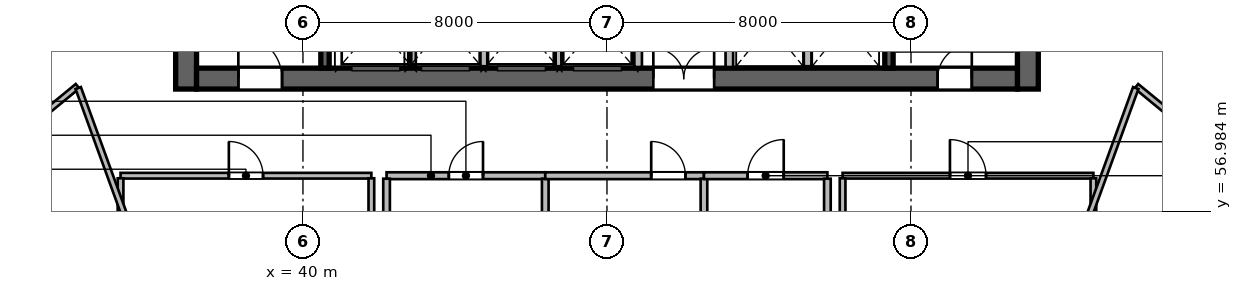
"""IFC4 building model, lengths in metres.
Left out: names, types, materials, properties, quantities, classifications, styles, units other than length and angle.
Written with IfcOpenShell. Run it as: python <this file> out.ifc"""

import sys

from ifc_helpers import new_model, si_unit, direction, frame, frame_2d, origin, place, context, subcontext, project, spatial, rectangle, extrude, source, transform, mapped, element, fill, save


model = new_model("IFC4")
c1 = context("Model", 3, precision=1e-05, world=origin(), true_north=direction((0.0, 1.0)))
c2 = subcontext(c1, "Body", "Model", "MODEL_VIEW")
j1 = project(units=[si_unit("LENGTHUNIT", "METRE"), si_unit("PLANEANGLEUNIT", "RADIAN")], contexts=[c1])
p1 = place(None, origin())
s1 = spatial("IfcSite", under=j1, at=p1, CompositionType="ELEMENT")
p2 = place(p1, origin())
s2 = spatial("IfcBuilding", under=s1, at=p2, CompositionType="ELEMENT")
p3 = place(p2, frame((0.0, 0.0, 46.2)))
s3 = spatial("IfcBuildingStorey", under=s2, at=p3, CompositionType="ELEMENT", Elevation=46.2)
m1 = source(origin(), c2, "Body", "SweptSolid", [
    extrude(rectangle(XDim=12.0, YDim=0.55, at=frame_2d((6.0, 0.0))), origin(), (0.0, 0.0, 1.0), 3.6),
])
for number, where, z_axis, x_axis in (
    (1, (36.925, 60.2, 0.0), (0.0, 0.0, 1.0), (0.0, 1.0, 0.0)),
    (2, (59.075, 60.2, 0.0), (0.0, 0.0, 1.0), (0.0, 1.0, 0.0)),
):
    element("IfcWall", number, at=place(p3, frame(where, z_axis=z_axis, x_axis=x_axis)), inside=s3, PredefinedType="SHEAR", context=c2, shape_type="MappedRepresentation", body=[
        mapped(m1, transform((0.0, 0.0, 0.0), scale=1.0)),
    ])
m2 = source(origin(), c2, "Body", "SweptSolid", [
    extrude(rectangle(XDim=21.6, YDim=0.55, at=frame_2d((10.8, 0.0))), origin(), (0.0, 0.0, 1.0), 3.6),
])
p4 = place(p3, frame((37.2, 60.475, 0.0), z_axis=(0.0, 0.0, 1.0), x_axis=(1.0, 0.0, 0.0)))
e3 = element("IfcWall", 3, at=p4, inside=s3, PredefinedType="SHEAR", context=c2, shape_type="MappedRepresentation", body=[
    mapped(m2, transform((0.0, 0.0, 0.0), scale=1.0)),
])
p5 = place(p4, frame((1.1, 0.0, 0.0)))
e4 = element("IfcOpeningElement", 4, at=p5, cuts=e3, PredefinedType="OPENING", context=c2, shape_type="SweptSolid", body=[
    extrude(rectangle(XDim=1.15, YDim=2.15, at=frame_2d((0.575, 1.075))), frame((0.0, 0.285, 0.0), z_axis=(0.0, -1.0, 0.0), x_axis=(1.0, 0.0, 0.0)), (0.0, 0.0, 1.0), 0.57),
])
p6 = place(p4, frame((19.5, 0.0, 0.0)))
e5 = element("IfcOpeningElement", 5, at=p6, cuts=e3, PredefinedType="OPENING", context=c2, shape_type="SweptSolid", body=[
    extrude(rectangle(XDim=0.9, YDim=2.1, at=frame_2d((0.45, 1.05))), frame((0.0, 0.285, 0.0), z_axis=(0.0, -1.0, 0.0), x_axis=(1.0, 0.0, 0.0)), (0.0, 0.0, 1.0), 0.57),
])
p7 = place(p4, frame((12.02, 0.0, 0.0)))
e6 = element("IfcOpeningElement", 6, at=p7, cuts=e3, PredefinedType="OPENING", context=c2, shape_type="SweptSolid", body=[
    extrude(rectangle(XDim=1.6, YDim=2.15, at=frame_2d((0.8, 1.075))), frame((0.0, 0.285, 0.0), z_axis=(0.0, -1.0, 0.0), x_axis=(1.0, 0.0, 0.0)), (0.0, 0.0, 1.0), 0.57),
])
m3 = source(origin(), c2, "Body", "SweptSolid", [
    extrude(rectangle(XDim=10.9, YDim=0.22, at=frame_2d((5.45, 0.0))), origin(), (0.0, 0.0, 1.0), 3.6),
])
p8 = place(p3, frame((40.58, 60.75, 0.0), z_axis=(0.0, 0.0, 1.0), x_axis=(0.0, 1.0, 0.0)))
e7 = element("IfcWall", 7, at=p8, inside=s3, PredefinedType="SHEAR", context=c2, shape_type="MappedRepresentation", body=[
    mapped(m3, transform((0.0, 0.0, 0.0), scale=1.0)),
])
p9 = place(p3, frame((55.42, 60.75, 0.0), z_axis=(0.0, 0.0, 1.0), x_axis=(0.0, 1.0, 0.0)))
e8 = element("IfcWall", 8, at=p9, inside=s3, PredefinedType="SHEAR", context=c2, shape_type="MappedRepresentation", body=[
    mapped(m3, transform((0.0, 0.0, 0.0), scale=1.0)),
])
p10 = place(p9, frame((9.495, 0.0, 0.0)))
e9 = element("IfcOpeningElement", 9, at=p10, cuts=e8, PredefinedType="OPENING", context=c2, shape_type="SweptSolid", body=[
    extrude(rectangle(XDim=1.15, YDim=2.15, at=frame_2d((0.575, 1.075))), frame((0.0, 0.12, 0.0), z_axis=(0.0, -1.0, 0.0), x_axis=(1.0, 0.0, 0.0)), (0.0, 0.0, 1.0), 0.24),
])
m4 = source(origin(), c2, "Body", "SweptSolid", [
    extrude(rectangle(XDim=2.24, YDim=0.2, at=frame_2d((1.12, 0.0))), origin(), (0.0, 0.0, 1.0), 3.36),
])
for number, where, z_axis, x_axis in (
    (10, (48.82, 60.78, 0.0), (0.0, 0.0, 1.0), (0.0, 1.0, 0.0)),
    (11, (51.22, 60.78, 0.0), (0.0, 0.0, 1.0), (0.0, 1.0, 0.0)),
):
    element("IfcWall", number, at=place(p3, frame(where, z_axis=z_axis, x_axis=x_axis)), inside=s3, PredefinedType="SOLIDWALL", context=c2, shape_type="MappedRepresentation", body=[
        mapped(m4, transform((0.0, 0.0, 0.0), scale=1.0)),
    ])
m5 = source(origin(), c2, "Body", "SweptSolid", [
    extrude(rectangle(XDim=2.2, YDim=0.2, at=frame_2d((1.1, 0.0))), origin(), (0.0, 0.0, 1.0), 3.36),
])
for number, where, z_axis, x_axis in (
    (12, (42.87, 60.8, 0.0), (0.0, 0.0, 1.0), (0.0, 1.0, 0.0)),
    (13, (44.77, 60.8, 0.0), (0.0, 0.0, 1.0), (0.0, 1.0, 0.0)),
    (14, (46.7, 60.8, 0.0), (0.0, 0.0, 1.0), (0.0, 1.0, 0.0)),
    (15, (53.28, 60.8, 0.0), (0.0, 0.0, 1.0), (0.0, 1.0, 0.0)),
):
    element("IfcWall", number, at=place(p3, frame(where, z_axis=z_axis, x_axis=x_axis)), inside=s3, PredefinedType="SOLIDWALL", context=c2, shape_type="MappedRepresentation", body=[
        mapped(m5, transform((0.0, 0.0, 0.0), scale=1.0)),
    ])
m6 = source(origin(), c2, "Body", "SweptSolid", [
    extrude(rectangle(XDim=6.6, YDim=0.15, at=frame_2d((3.3, 0.0))), origin(), (0.0, 0.0, 1.0), 3.36),
])
p11 = place(p3, frame((35.2, 57.92, 0.0), z_axis=(0.0, 0.0, 1.0), x_axis=(1.0, 0.0, 0.0)))
e16 = element("IfcWall", 16, at=p11, inside=s3, PredefinedType="PARTITIONING", context=c2, shape_type="MappedRepresentation", body=[
    mapped(m6, transform((0.0, 0.0, 0.0), scale=1.0)),
])
p12 = place(p11, frame((2.85, 0.0, 0.0)))
e17 = element("IfcOpeningElement", 17, at=p12, cuts=e16, PredefinedType="OPENING", context=c2, shape_type="SweptSolid", body=[
    extrude(rectangle(XDim=0.9, YDim=2.1, at=frame_2d((0.45, 1.05))), frame((0.0, 0.085, 0.0), z_axis=(0.0, -1.0, 0.0), x_axis=(1.0, 0.0, 0.0)), (0.0, 0.0, 1.0), 0.17),
])
m7 = source(origin(), c2, "Body", "SweptSolid", [
    extrude(rectangle(XDim=3.785, YDim=0.15, at=frame_2d((1.893, 0.0))), origin(), (0.0, 0.0, 1.0), 3.36),
])
for number, where, z_axis, x_axis in (
    (18, (35.2, 54.067, 0.0), (0.0, 0.0, 1.0), (0.0, 1.0, 0.0)),
    (19, (41.8, 54.067, 0.0), (0.0, 0.0, 1.0), (0.0, 1.0, 0.0)),
):
    element("IfcWall", number, at=place(p3, frame(where, z_axis=z_axis, x_axis=x_axis)), inside=s3, PredefinedType="PARTITIONING", context=c2, shape_type="MappedRepresentation", body=[
        mapped(m7, transform((0.0, 0.0, 0.0), scale=1.0)),
    ])
m8 = source(origin(), c2, "Body", "SweptSolid", [
    extrude(rectangle(XDim=4.176, YDim=0.18, at=frame_2d((2.088, 0.0))), origin(), (0.0, 0.0, 1.0), 3.36),
])
p13 = place(p3, frame((42.2, 57.92, 0.0), z_axis=(0.0, 0.0, 1.0), x_axis=(1.0, 0.0, 0.0)))
e20 = element("IfcWall", 20, at=p13, inside=s3, PredefinedType="PLUMBINGWALL", context=c2, shape_type="MappedRepresentation", body=[
    mapped(m8, transform((0.0, 0.0, 0.0), scale=1.0)),
])
p14 = place(p13, frame((1.638, 0.0, 0.0)))
e21 = element("IfcOpeningElement", 21, at=p14, cuts=e20, PredefinedType="OPENING", context=c2, shape_type="SweptSolid", body=[
    extrude(rectangle(XDim=0.9, YDim=2.08, at=frame_2d((0.45, 1.04))), frame((0.0, 0.1, 0.0), z_axis=(0.0, -1.0, 0.0), x_axis=(1.0, 0.0, 0.0)), (0.0, 0.0, 1.0), 0.2),
])
m9 = source(origin(), c2, "Body", "SweptSolid", [
    extrude(rectangle(XDim=3.763, YDim=0.175, at=frame_2d((1.881, 0.0))), origin(), (0.0, 0.0, 1.0), 3.36),
])
for number, where, z_axis, x_axis in (
    (22, (42.2, 54.079, 0.0), (0.0, 0.0, 1.0), (0.0, 1.0, 0.0)),
    (23, (46.376, 54.079, 0.0), (0.0, 0.0, 1.0), (0.0, 1.0, 0.0)),
):
    element("IfcWall", number, at=place(p3, frame(where, z_axis=z_axis, x_axis=x_axis)), inside=s3, PredefinedType="PARTITIONING", context=c2, shape_type="MappedRepresentation", body=[
        mapped(m9, transform((0.0, 0.0, 0.0), scale=1.0)),
    ])
p15 = place(p3, frame((46.376, 57.92, 0.0), z_axis=(0.0, 0.0, 1.0), x_axis=(1.0, 0.0, 0.0)))
e24 = element("IfcWall", 24, at=p15, inside=s3, PredefinedType="PLUMBINGWALL", context=c2, shape_type="MappedRepresentation", body=[
    mapped(m8, transform((0.0, 0.0, 0.0), scale=1.0)),
])
p16 = place(p15, frame((2.788, 0.0, 0.0)))
e25 = element("IfcOpeningElement", 25, at=p16, cuts=e24, PredefinedType="OPENING", context=c2, shape_type="SweptSolid", body=[
    extrude(rectangle(XDim=0.9, YDim=2.08, at=frame_2d((0.45, 1.04))), frame((0.0, 0.1, 0.0), z_axis=(0.0, -1.0, 0.0), x_axis=(1.0, 0.0, 0.0)), (0.0, 0.0, 1.0), 0.2),
])
p17 = place(p3, frame((50.552, 54.079, 0.0), z_axis=(0.0, 0.0, 1.0), x_axis=(0.0, 1.0, 0.0)))
e26 = element("IfcWall", 26, at=p17, inside=s3, PredefinedType="PARTITIONING", context=c2, shape_type="MappedRepresentation", body=[
    mapped(m9, transform((0.0, 0.0, 0.0), scale=1.0)),
])
m10 = source(origin(), c2, "Body", "SweptSolid", [
    extrude(rectangle(XDim=3.248, YDim=0.18, at=frame_2d((1.624, 0.0))), origin(), (0.0, 0.0, 1.0), 3.36),
])
p18 = place(p3, frame((50.552, 57.92, 0.0), z_axis=(0.0, 0.0, 1.0), x_axis=(1.0, 0.0, 0.0)))
e27 = element("IfcWall", 27, at=p18, inside=s3, PredefinedType="PLUMBINGWALL", context=c2, shape_type="MappedRepresentation", body=[
    mapped(m10, transform((0.0, 0.0, 0.0), scale=1.0)),
])
p19 = place(p18, frame((1.149, 0.0, 0.0)))
e28 = element("IfcOpeningElement", 28, at=p19, cuts=e27, PredefinedType="OPENING", context=c2, shape_type="SweptSolid", body=[
    extrude(rectangle(XDim=0.95, YDim=2.12, at=frame_2d((0.475, 1.06))), frame((0.0, 0.1, 0.0), z_axis=(0.0, -1.0, 0.0), x_axis=(1.0, 0.0, 0.0)), (0.0, 0.0, 1.0), 0.2),
])
p20 = place(p3, frame((53.8, 54.079, 0.0), z_axis=(0.0, 0.0, 1.0), x_axis=(0.0, 1.0, 0.0)))
e29 = element("IfcWall", 29, at=p20, inside=s3, PredefinedType="PARTITIONING", context=c2, shape_type="MappedRepresentation", body=[
    mapped(m9, transform((0.0, 0.0, 0.0), scale=1.0)),
])
p21 = place(p3, frame((54.2, 57.92, 0.0), z_axis=(0.0, 0.0, 1.0), x_axis=(1.0, 0.0, 0.0)))
e30 = element("IfcWall", 30, at=p21, inside=s3, PredefinedType="PARTITIONING", context=c2, shape_type="MappedRepresentation", body=[
    mapped(m6, transform((0.0, 0.0, 0.0), scale=1.0)),
])
p22 = place(p21, frame((2.825, 0.0, 0.0)))
e31 = element("IfcOpeningElement", 31, at=p22, cuts=e30, PredefinedType="OPENING", context=c2, shape_type="SweptSolid", body=[
    extrude(rectangle(XDim=0.95, YDim=2.1, at=frame_2d((0.475, 1.05))), frame((0.0, 0.085, 0.0), z_axis=(0.0, -1.0, 0.0), x_axis=(1.0, 0.0, 0.0)), (0.0, 0.0, 1.0), 0.17),
])
for number, where, z_axis, x_axis in (
    (32, (54.2, 54.067, 0.0), (0.0, 0.0, 1.0), (0.0, 1.0, 0.0)),
    (33, (60.8, 54.067, 0.0), (0.0, 0.0, 1.0), (0.0, 1.0, 0.0)),
):
    element("IfcWall", number, at=place(p3, frame(where, z_axis=z_axis, x_axis=x_axis)), inside=s3, PredefinedType="PARTITIONING", context=c2, shape_type="MappedRepresentation", body=[
        mapped(m7, transform((0.0, 0.0, 0.0), scale=1.0)),
    ])
m11 = source(origin(), c2, "Body", "SweptSolid", [
    extrude(rectangle(XDim=6.721, YDim=0.15, at=frame_2d((3.361, 0.0))), origin(), (0.0, 0.0, 1.0), 3.36),
])
p23 = place(p3, frame((28.874, 56.01, 0.0), z_axis=(0.0, 0.0, 1.0), x_axis=(0.772828051199, 0.63461547671, 0.0)))
e34 = element("IfcWall", 34, at=p23, inside=s3, PredefinedType="PARTITIONING", context=c2, shape_type="MappedRepresentation", body=[
    mapped(m11, transform((0.0, 0.0, 0.0), scale=1.0)),
])
m12 = source(origin(), c2, "Body", "SweptSolid", [
    extrude(rectangle(XDim=12.196, YDim=0.15, at=frame_2d((6.098, 0.0))), origin(), (0.0, 0.0, 1.0), 3.36),
])
p24 = place(p3, frame((38.258, 48.766, 0.0), z_axis=(0.0, 0.0, 1.0), x_axis=(-0.342022711534, 0.939691686031, 0.0)))
e35 = element("IfcWall", 35, at=p24, inside=s3, PredefinedType="PARTITIONING", context=c2, shape_type="MappedRepresentation", body=[
    mapped(m12, transform((0.0, 0.0, 0.0), scale=1.0)),
])
p25 = place(p3, frame((61.931, 60.275, 0.0), z_axis=(0.0, 0.0, 1.0), x_axis=(0.772828051199, -0.63461547671, 0.0)))
e36 = element("IfcWall", 36, at=p25, inside=s3, PredefinedType="PARTITIONING", context=c2, shape_type="MappedRepresentation", body=[
    mapped(m11, transform((0.0, 0.0, 0.0), scale=1.0)),
])
p26 = place(p25, frame((2.66, 0.0, 0.0)))
e37 = element("IfcOpeningElement", 37, at=p26, cuts=e36, PredefinedType="OPENING", context=c2, shape_type="SweptSolid", body=[
    extrude(rectangle(XDim=1.4, YDim=2.15, at=frame_2d((0.7, 1.075))), frame((0.0, 0.085, 0.0), z_axis=(0.0, -1.0, 0.0), x_axis=(1.0, 0.0, 0.0)), (0.0, 0.0, 1.0), 0.17),
])
p27 = place(p3, frame((57.742, 48.766, 0.0), z_axis=(0.0, 0.0, 1.0), x_axis=(0.342022711534, 0.939691686031, 0.0)))
e38 = element("IfcWall", 38, at=p27, inside=s3, PredefinedType="PARTITIONING", context=c2, shape_type="MappedRepresentation", body=[
    mapped(m12, transform((0.0, 0.0, 0.0), scale=1.0)),
])
m13 = source(origin(), c2, "Body", "SweptSolid", [
    extrude(rectangle(XDim=1.15, YDim=2.15, at=frame_2d((0.575, 1.075))), frame((0.0, 0.025, 0.0), z_axis=(0.0, -1.0, 0.0), x_axis=(1.0, 0.0, 0.0)), (0.0, 0.0, 1.0), 0.05),
])
p28 = place(p5, origin())
e39 = element("IfcDoor", 39, at=p28, inside=s3, OperationType="SINGLE_SWING_LEFT", PredefinedType="DOOR", context=c2, shape_type="MappedRepresentation", body=[
    mapped(m13, transform((0.0, 0.0, 0.0), scale=1.0)),
])
fill(e4, e39)
m14 = source(origin(), c2, "Body", "SweptSolid", [
    extrude(rectangle(XDim=0.9, YDim=2.1, at=frame_2d((0.45, 1.05))), frame((0.0, 0.025, 0.0), z_axis=(0.0, -1.0, 0.0), x_axis=(1.0, 0.0, 0.0)), (0.0, 0.0, 1.0), 0.05),
])
p29 = place(p6, origin())
e40 = element("IfcDoor", 40, at=p29, inside=s3, OperationType="SINGLE_SWING_RIGHT", PredefinedType="DOOR", context=c2, shape_type="MappedRepresentation", body=[
    mapped(m14, transform((0.0, 0.0, 0.0), scale=1.0)),
])
fill(e5, e40)
m15 = source(origin(), c2, "Body", "SweptSolid", [
    extrude(rectangle(XDim=1.6, YDim=2.15, at=frame_2d((0.8, 1.075))), frame((0.0, 0.025, 0.0), z_axis=(0.0, -1.0, 0.0), x_axis=(1.0, 0.0, 0.0)), (0.0, 0.0, 1.0), 0.05),
])
p30 = place(p7, origin())
e41 = element("IfcDoor", 41, at=p30, inside=s3, OperationType="DOUBLE_DOOR_SINGLE_SWING", PredefinedType="DOOR", context=c2, shape_type="MappedRepresentation", body=[
    mapped(m15, transform((0.0, 0.0, 0.0), scale=1.0)),
])
fill(e6, e41)
p31 = place(p12, origin())
e42 = element("IfcDoor", 42, at=p31, inside=s3, OperationType="SINGLE_SWING_LEFT", PredefinedType="DOOR", context=c2, shape_type="MappedRepresentation", body=[
    mapped(m14, transform((0.0, 0.0, 0.0), scale=1.0)),
])
fill(e17, e42)
m16 = source(origin(), c2, "Body", "SweptSolid", [
    extrude(rectangle(XDim=0.9, YDim=2.08, at=frame_2d((0.45, 1.04))), frame((0.0, 0.025, 0.0), z_axis=(0.0, -1.0, 0.0), x_axis=(1.0, 0.0, 0.0)), (0.0, 0.0, 1.0), 0.05),
])
p32 = place(p14, origin())
e43 = element("IfcDoor", 43, at=p32, inside=s3, OperationType="SINGLE_SWING_RIGHT", PredefinedType="DOOR", context=c2, shape_type="MappedRepresentation", body=[
    mapped(m16, transform((0.0, 0.0, 0.0), scale=1.0)),
])
fill(e21, e43)
p33 = place(p16, origin())
e44 = element("IfcDoor", 44, at=p33, inside=s3, OperationType="SINGLE_SWING_LEFT", PredefinedType="DOOR", context=c2, shape_type="MappedRepresentation", body=[
    mapped(m16, transform((0.0, 0.0, 0.0), scale=1.0)),
])
fill(e25, e44)
m17 = source(origin(), c2, "Body", "SweptSolid", [
    extrude(rectangle(XDim=0.95, YDim=2.12, at=frame_2d((0.475, 1.06))), frame((0.0, 0.025, 0.0), z_axis=(0.0, -1.0, 0.0), x_axis=(1.0, 0.0, 0.0)), (0.0, 0.0, 1.0), 0.05),
])
p34 = place(p19, origin())
e45 = element("IfcDoor", 45, at=p34, inside=s3, OperationType="SINGLE_SWING_RIGHT", PredefinedType="DOOR", context=c2, shape_type="MappedRepresentation", body=[
    mapped(m17, transform((0.0, 0.0, 0.0), scale=1.0)),
])
fill(e28, e45)
m18 = source(origin(), c2, "Body", "SweptSolid", [
    extrude(rectangle(XDim=0.95, YDim=2.1, at=frame_2d((0.475, 1.05))), frame((0.0, 0.025, 0.0), z_axis=(0.0, -1.0, 0.0), x_axis=(1.0, 0.0, 0.0)), (0.0, 0.0, 1.0), 0.05),
])
p35 = place(p22, origin())
e46 = element("IfcDoor", 46, at=p35, inside=s3, OperationType="SINGLE_SWING_LEFT", PredefinedType="DOOR", context=c2, shape_type="MappedRepresentation", body=[
    mapped(m18, transform((0.0, 0.0, 0.0), scale=1.0)),
])
fill(e31, e46)
save(model, sys.argv[1])
